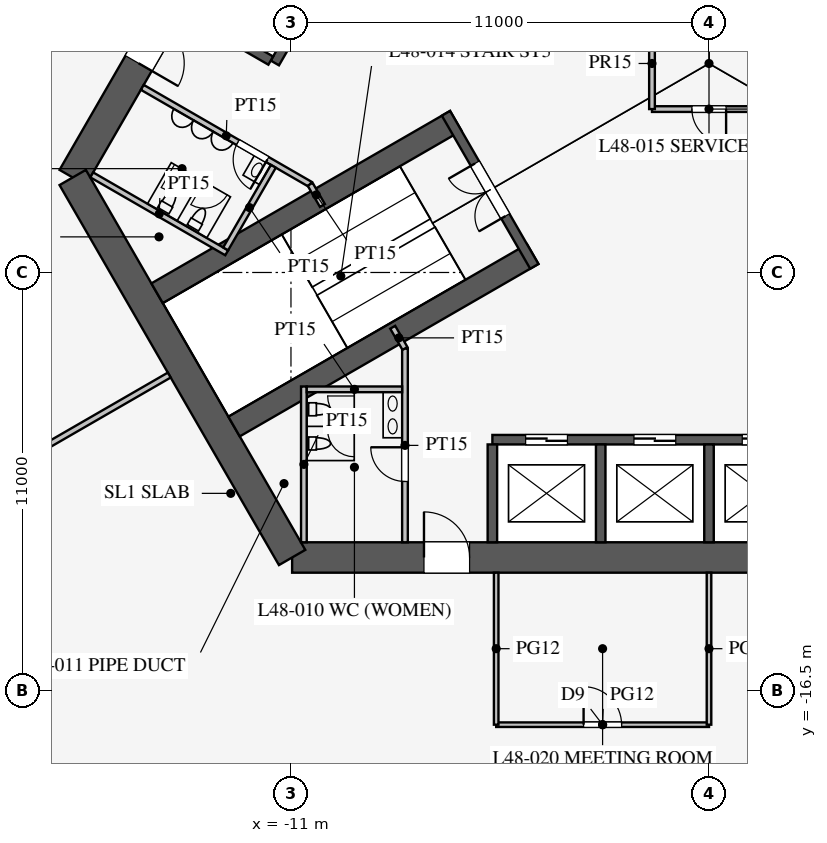
"""IFC4 building model, lengths in metres.
Left out: names, types, materials, properties, quantities, classifications, styles, units other than length and angle.
Written with IfcOpenShell. Run it as: python <this file> out.ifc"""

import sys

from ifc_helpers import new_model, si_unit, direction, frame, frame_2d, origin, place, context, subcontext, project, spatial, rectangle, extrude, element, fill, save


model = new_model("IFC4")
c1 = context("Model", 3, precision=1e-05, world=origin(), true_north=direction((0.0, 1.0)))
c2 = subcontext(c1, "Body", "Model", "MODEL_VIEW")
j1 = project(units=[si_unit("LENGTHUNIT", "METRE"), si_unit("PLANEANGLEUNIT", "RADIAN")], contexts=[c1])
p1 = place(None, origin())
s1 = spatial("IfcSite", under=j1, at=p1, CompositionType="ELEMENT")
p2 = place(p1, origin())
s2 = spatial("IfcBuilding", under=s1, at=p2, CompositionType="ELEMENT")
p3 = place(p2, frame((0.0, 0.0, 210.7)))
s3 = spatial("IfcBuildingStorey", under=s2, at=p3, CompositionType="ELEMENT", Elevation=210.7)
p4 = place(p3, frame((-10.97, -13.0, 0.0), z_axis=(0.0, 0.0, 1.0), x_axis=(1.0, 0.0, 0.0)))
e1 = element("IfcWall", 1, at=p4, inside=s3, PredefinedType="SHEAR", context=c2, shape_type="SweptSolid", body=[
    extrude(rectangle(XDim=21.939, YDim=0.8, at=frame_2d((10.97, 0.0))), origin(), (0.0, 0.0, 1.0), 4.2),
])
p5 = place(p4, frame((17.27, 0.0, 0.0)))
e2 = element("IfcOpeningElement", 2, at=p5, cuts=e1, PredefinedType="OPENING", context=c2, shape_type="SweptSolid", body=[
    extrude(rectangle(XDim=1.2, YDim=2.1, at=frame_2d((0.6, 1.05))), frame((0.0, 0.41, 0.0), z_axis=(0.0, -1.0, 0.0), x_axis=(1.0, 0.0, 0.0)), (0.0, 0.0, 1.0), 0.82),
])
p6 = place(p4, frame((3.47, 0.0, 0.0)))
e3 = element("IfcOpeningElement", 3, at=p6, cuts=e1, PredefinedType="OPENING", context=c2, shape_type="SweptSolid", body=[
    extrude(rectangle(XDim=1.2, YDim=2.1, at=frame_2d((0.6, 1.05))), frame((0.0, 0.41, 0.0), z_axis=(0.0, -1.0, 0.0), x_axis=(1.0, 0.0, 0.0)), (0.0, 0.0, 1.0), 0.82),
])
p7 = place(p3, frame((-5.773, 16.0, 0.0), z_axis=(0.0, 0.0, 1.0), x_axis=(-0.500002442456, -0.866023993627, 0.0)))
e4 = element("IfcWall", 4, at=p7, inside=s3, PredefinedType="SHEAR", context=c2, shape_type="SweptSolid", body=[
    extrude(rectangle(XDim=21.939, YDim=0.8, at=frame_2d((10.97, 0.0))), origin(), (0.0, 0.0, 1.0), 4.2),
])
p8 = place(p7, frame((17.27, 0.0, 0.0)))
e5 = element("IfcOpeningElement", 5, at=p8, cuts=e4, PredefinedType="OPENING", context=c2, shape_type="SweptSolid", body=[
    extrude(rectangle(XDim=1.2, YDim=2.1, at=frame_2d((0.6, 1.05))), frame((0.0, 0.41, 0.0), z_axis=(0.0, -1.0, 0.0), x_axis=(1.0, 0.0, 0.0)), (0.0, 0.0, 1.0), 0.82),
])
p9 = place(p7, frame((3.47, 0.0, 0.0)))
e6 = element("IfcOpeningElement", 6, at=p9, cuts=e4, PredefinedType="OPENING", context=c2, shape_type="SweptSolid", body=[
    extrude(rectangle(XDim=1.2, YDim=2.1, at=frame_2d((0.6, 1.05))), frame((0.0, 0.41, 0.0), z_axis=(0.0, -1.0, 0.0), x_axis=(1.0, 0.0, 0.0)), (0.0, 0.0, 1.0), 0.82),
])
p10 = place(p3, frame((-16.743, -3.0, 0.0), z_axis=(0.0, 0.0, 1.0), x_axis=(0.499995765644, -0.866027848477, 0.0)))
e7 = element("IfcWall", 7, at=p10, inside=s3, PredefinedType="SHEAR", context=c2, shape_type="SweptSolid", body=[
    extrude(rectangle(XDim=11.547, YDim=0.8, at=frame_2d((5.773, 0.0))), origin(), (0.0, 0.0, 1.0), 4.2),
])
p11 = place(p3, frame((-5.7, -9.9, 0.0), z_axis=(0.0, 0.0, 1.0), x_axis=(1.0, 0.0, 0.0)))
e8 = element("IfcWall", 8, at=p11, inside=s3, PredefinedType="SHEAR", context=c2, shape_type="SweptSolid", body=[
    extrude(rectangle(XDim=11.4, YDim=0.25, at=frame_2d((5.7, 0.0))), origin(), (0.0, 0.0, 1.0), 4.2),
])
p12 = place(p11, frame((0.875, 0.0, 0.0)))
e9 = element("IfcOpeningElement", 9, at=p12, cuts=e8, PredefinedType="OPENING", context=c2, shape_type="SweptSolid", body=[
    extrude(rectangle(XDim=1.1, YDim=2.2, at=frame_2d((0.55, 1.1))), frame((0.0, 0.135, 0.0), z_axis=(0.0, -1.0, 0.0), x_axis=(1.0, 0.0, 0.0)), (0.0, 0.0, 1.0), 0.27),
])
p13 = place(p11, frame((3.725, 0.0, 0.0)))
e10 = element("IfcOpeningElement", 10, at=p13, cuts=e8, PredefinedType="OPENING", context=c2, shape_type="SweptSolid", body=[
    extrude(rectangle(XDim=1.1, YDim=2.2, at=frame_2d((0.55, 1.1))), frame((0.0, 0.135, 0.0), z_axis=(0.0, -1.0, 0.0), x_axis=(1.0, 0.0, 0.0)), (0.0, 0.0, 1.0), 0.27),
])
p14 = place(p11, frame((6.575, 0.0, 0.0)))
e11 = element("IfcOpeningElement", 11, at=p14, cuts=e8, PredefinedType="OPENING", context=c2, shape_type="SweptSolid", body=[
    extrude(rectangle(XDim=1.1, YDim=2.2, at=frame_2d((0.55, 1.1))), frame((0.0, 0.135, 0.0), z_axis=(0.0, -1.0, 0.0), x_axis=(1.0, 0.0, 0.0)), (0.0, 0.0, 1.0), 0.27),
])
p15 = place(p11, frame((9.425, 0.0, 0.0)))
e12 = element("IfcOpeningElement", 12, at=p15, cuts=e8, PredefinedType="OPENING", context=c2, shape_type="SweptSolid", body=[
    extrude(rectangle(XDim=1.1, YDim=2.2, at=frame_2d((0.55, 1.1))), frame((0.0, 0.135, 0.0), z_axis=(0.0, -1.0, 0.0), x_axis=(1.0, 0.0, 0.0)), (0.0, 0.0, 1.0), 0.27),
])
for number, where, z_axis, x_axis in (
    (13, (-5.7, -10.025, 0.0), (0.0, 0.0, 1.0), (0.0, -1.0, 0.0)),
    (14, (-2.85, -10.025, 0.0), (0.0, 0.0, 1.0), (0.0, -1.0, 0.0)),
    (15, (0.0, -10.025, 0.0), (0.0, 0.0, 1.0), (0.0, -1.0, 0.0)),
):
    element("IfcWall", number, at=place(p3, frame(where, z_axis=z_axis, x_axis=x_axis)), inside=s3, PredefinedType="SHEAR", context=c2, shape_type="SweptSolid", body=[
        extrude(rectangle(XDim=2.575, YDim=0.25, at=frame_2d((1.288, 0.0))), origin(), (0.0, 0.0, 1.0), 4.2),
    ])
p16 = place(p3, frame((-5.724, 9.886, 0.0), z_axis=(0.0, 0.0, 1.0), x_axis=(-0.500001763848, -0.866024385424, 0.0)))
e16 = element("IfcWall", 16, at=p16, inside=s3, PredefinedType="SHEAR", context=c2, shape_type="SweptSolid", body=[
    extrude(rectangle(XDim=11.4, YDim=0.25, at=frame_2d((5.7, 0.0))), origin(), (0.0, 0.0, 1.0), 4.2),
])
p17 = place(p16, frame((6.525, 0.0, 0.0)))
e17 = element("IfcOpeningElement", 17, at=p17, cuts=e16, PredefinedType="OPENING", context=c2, shape_type="SweptSolid", body=[
    extrude(rectangle(XDim=1.2, YDim=2.2, at=frame_2d((0.6, 1.1))), frame((0.0, 0.135, 0.0), z_axis=(0.0, -1.0, 0.0), x_axis=(1.0, 0.0, 0.0)), (0.0, 0.0, 1.0), 0.27),
])
p18 = place(p16, frame((9.375, 0.0, 0.0)))
e18 = element("IfcOpeningElement", 18, at=p18, cuts=e16, PredefinedType="OPENING", context=c2, shape_type="SweptSolid", body=[
    extrude(rectangle(XDim=1.2, YDim=2.2, at=frame_2d((0.6, 1.1))), frame((0.0, 0.135, 0.0), z_axis=(0.0, -1.0, 0.0), x_axis=(1.0, 0.0, 0.0)), (0.0, 0.0, 1.0), 0.27),
])
p19 = place(p3, frame((-11.532, 0.076, 0.0), z_axis=(0.0, 0.0, 1.0), x_axis=(-0.866005588531, 0.500034319456, 0.0)))
e19 = element("IfcWall", 19, at=p19, inside=s3, PredefinedType="SHEAR", context=c2, shape_type="SweptSolid", body=[
    extrude(rectangle(XDim=2.575, YDim=0.25, at=frame_2d((1.288, 0.0))), origin(), (0.0, 0.0, 1.0), 4.2),
])
for number, where, z_axis, x_axis in (
    (20, (-6.663, -1.509, 0.0), (0.0, 0.0, 1.0), (-0.866, -0.5, 0.0)),
    (21, (-4.638, -5.016, 0.0), (0.0, 0.0, 1.0), (-0.866, -0.5, 0.0)),
):
    element("IfcWall", number, at=place(p3, frame(where, z_axis=z_axis, x_axis=x_axis)), inside=s3, PredefinedType="SHEAR", context=c2, shape_type="SweptSolid", body=[
        extrude(rectangle(XDim=9.075, YDim=0.6, at=frame_2d((4.538, 0.0))), origin(), (0.0, 0.0, 1.0), 4.2),
    ])
p20 = place(p3, frame((-6.922, -1.312, 0.0), z_axis=(0.0, 0.0, 1.0), x_axis=(0.499984536904, -0.866034331223, 0.0)))
e22 = element("IfcWall", 22, at=p20, inside=s3, PredefinedType="SHEAR", context=c2, shape_type="SweptSolid", body=[
    extrude(rectangle(XDim=4.65, YDim=0.25, at=frame_2d((2.325, 0.0))), origin(), (0.0, 0.0, 1.0), 4.2),
])
p21 = place(p20, frame((1.525, 0.0, 0.0)))
e23 = element("IfcOpeningElement", 23, at=p21, cuts=e22, PredefinedType="OPENING", context=c2, shape_type="SweptSolid", body=[
    extrude(rectangle(XDim=1.6, YDim=2.1, at=frame_2d((0.8, 1.05))), frame((0.0, 0.135, 0.0), z_axis=(0.0, -1.0, 0.0), x_axis=(1.0, 0.0, 0.0)), (0.0, 0.0, 1.0), 0.27),
])
p22 = place(p3, frame((-8.0, -7.5, 0.0), z_axis=(0.0, 0.0, 1.0), x_axis=(0.0, -1.0, 0.0)))
e24 = element("IfcWall", 24, at=p22, inside=s3, PredefinedType="PARTITIONING", context=c2, shape_type="SweptSolid", body=[
    extrude(rectangle(XDim=5.1, YDim=0.15, at=frame_2d((2.55, 0.0))), origin(), (0.0, 0.0, 1.0), 4.0),
])
p23 = place(p22, frame((2.6, 0.0, 0.0)))
e25 = element("IfcOpeningElement", 25, at=p23, cuts=e24, PredefinedType="OPENING", context=c2, shape_type="SweptSolid", body=[
    extrude(rectangle(XDim=0.9, YDim=2.1, at=frame_2d((0.45, 1.05))), frame((0.0, 0.085, 0.0), z_axis=(0.0, -1.0, 0.0), x_axis=(1.0, 0.0, 0.0)), (0.0, 0.0, 1.0), 0.17),
])
p24 = place(p3, frame((-10.495, -3.178, 0.0), z_axis=(0.0, 0.0, 1.0), x_axis=(-0.86602216432, 0.500005610874, 0.0)))
e26 = element("IfcWall", 26, at=p24, inside=s3, PredefinedType="PARTITIONING", context=c2, shape_type="SweptSolid", body=[
    extrude(rectangle(XDim=5.1, YDim=0.15, at=frame_2d((2.55, 0.0))), origin(), (0.0, 0.0, 1.0), 4.0),
])
p25 = place(p24, frame((1.3, 0.0, 0.0)))
e27 = element("IfcOpeningElement", 27, at=p25, cuts=e26, PredefinedType="OPENING", context=c2, shape_type="SweptSolid", body=[
    extrude(rectangle(XDim=0.9, YDim=2.1, at=frame_2d((0.45, 1.05))), frame((0.0, 0.085, 0.0), z_axis=(0.0, -1.0, 0.0), x_axis=(1.0, 0.0, 0.0)), (0.0, 0.0, 1.0), 0.17),
])
for number, where, z_axis, x_axis in (
    (28, (-10.495, -3.178, 0.0), (0.0, 0.0, 1.0), (0.5, -0.866, 0.0)),
    (29, (-8.0, -7.5, 0.0), (0.0, 0.0, 1.0), (-0.5, 0.866, 0.0)),
):
    element("IfcWall", number, at=place(p3, frame(where, z_axis=z_axis, x_axis=x_axis)), inside=s3, PredefinedType="PARTITIONING", context=c2, shape_type="SweptSolid", body=[
        extrude(rectangle(XDim=0.645, YDim=0.15, at=frame_2d((0.323, 0.0))), origin(), (0.0, 0.0, 1.0), 4.0),
    ])
p26 = place(p3, frame((-12.691, -4.982, 0.0), z_axis=(0.0, 0.0, 1.0), x_axis=(-0.8660249478, 0.500000789788, 0.0)))
e30 = element("IfcWall", 30, at=p26, inside=s3, PredefinedType="PARTITIONING", context=c2, shape_type="SweptSolid", body=[
    extrude(rectangle(XDim=4.1, YDim=0.15, at=frame_2d((2.05, 0.0))), origin(), (0.0, 0.0, 1.0), 4.0),
])
p27 = place(p3, frame((-11.464, -2.706, 0.0), z_axis=(0.0, 0.0, 1.0), x_axis=(-0.50001992892, -0.866013897511, 0.0)))
e31 = element("IfcWall", 31, at=p27, inside=s3, PredefinedType="PARTITIONING", context=c2, shape_type="SweptSolid", body=[
    extrude(rectangle(XDim=2.51, YDim=0.15, at=frame_2d((1.255, 0.0))), origin(), (0.0, 0.0, 1.0), 4.0),
])
p28 = place(p3, frame((-10.66, -8.5, 0.0), z_axis=(0.0, 0.0, 1.0), x_axis=(0.0, -1.0, 0.0)))
e32 = element("IfcWall", 32, at=p28, inside=s3, PredefinedType="PARTITIONING", context=c2, shape_type="SweptSolid", body=[
    extrude(rectangle(XDim=4.1, YDim=0.15, at=frame_2d((2.05, 0.0))), origin(), (0.0, 0.0, 1.0), 4.0),
])
p29 = place(p3, frame((-8.075, -8.575, 0.0), z_axis=(0.0, 0.0, 1.0), x_axis=(-1.0, 0.0, 0.0)))
e33 = element("IfcWall", 33, at=p29, inside=s3, PredefinedType="PARTITIONING", context=c2, shape_type="SweptSolid", body=[
    extrude(rectangle(XDim=2.51, YDim=0.15, at=frame_2d((1.255, 0.0))), origin(), (0.0, 0.0, 1.0), 4.0),
])
p30 = place(p3, frame((-1.5, -1.2, 0.0), z_axis=(0.0, 0.0, 1.0), x_axis=(1.0, 0.0, 0.0)))
e34 = element("IfcWall", 34, at=p30, inside=s3, PredefinedType="PARTITIONING", context=c2, shape_type="SweptSolid", body=[
    extrude(rectangle(XDim=3.0, YDim=0.15, at=frame_2d((1.5, 0.0))), origin(), (0.0, 0.0, 1.0), 4.0),
])
p31 = place(p30, frame((1.05, 0.0, 0.0)))
e35 = element("IfcOpeningElement", 35, at=p31, cuts=e34, PredefinedType="OPENING", context=c2, shape_type="SweptSolid", body=[
    extrude(rectangle(XDim=0.9, YDim=2.1, at=frame_2d((0.45, 1.05))), frame((0.0, 0.085, 0.0), z_axis=(0.0, -1.0, 0.0), x_axis=(1.0, 0.0, 0.0)), (0.0, 0.0, 1.0), 0.17),
])
p32 = place(p3, frame((-1.5, 1.2, 0.0), z_axis=(0.0, 0.0, 1.0), x_axis=(0.0, -1.0, 0.0)))
e36 = element("IfcWall", 36, at=p32, inside=s3, PredefinedType="PARTITIONING", context=c2, shape_type="SweptSolid", body=[
    extrude(rectangle(XDim=2.4, YDim=0.15, at=frame_2d((1.2, 0.0))), origin(), (0.0, 0.0, 1.0), 4.0),
])
p33 = place(p3, frame((-14.203, -8.2, 0.0), z_axis=(0.0, 0.0, 1.0), x_axis=(-0.866021600284, -0.500006587798, 0.0)))
e37 = element("IfcWall", 37, at=p33, inside=s3, PredefinedType="PARTITIONING", context=c2, shape_type="SweptSolid", body=[
    extrude(rectangle(XDim=14.95, YDim=0.15, at=frame_2d((7.475, 0.0))), origin(), (0.0, 0.0, 1.0), 2.4),
])
p34 = place(p3, frame((-5.6, -17.4, 0.0), z_axis=(0.0, 0.0, 1.0), x_axis=(1.0, 0.0, 0.0)))
e38 = element("IfcWall", 38, at=p34, inside=s3, PredefinedType="PARTITIONING", context=c2, shape_type="SweptSolid", body=[
    extrude(rectangle(XDim=5.6, YDim=0.12, at=frame_2d((2.8, 0.0))), origin(), (0.0, 0.0, 1.0), 2.9),
])
p35 = place(p34, frame((2.3, 0.0, 0.15)))
e39 = element("IfcOpeningElement", 39, at=p35, cuts=e38, PredefinedType="OPENING", context=c2, shape_type="SweptSolid", body=[
    extrude(rectangle(XDim=1.0, YDim=2.1, at=frame_2d((0.5, 1.05))), frame((0.0, 0.07, 0.0), z_axis=(0.0, -1.0, 0.0), x_axis=(1.0, 0.0, 0.0)), (0.0, 0.0, 1.0), 0.14),
])
for number, where, z_axis, x_axis in (
    (40, (0.0, -13.4, 0.0), (0.0, 0.0, 1.0), (0.0, -1.0, 0.0)),
    (41, (-5.6, -13.4, 0.0), (0.0, 0.0, 1.0), (0.0, -1.0, 0.0)),
):
    element("IfcWall", number, at=place(p3, frame(where, z_axis=z_axis, x_axis=x_axis)), inside=s3, PredefinedType="PARTITIONING", context=c2, shape_type="SweptSolid", body=[
        extrude(rectangle(XDim=4.0, YDim=0.12, at=frame_2d((2.0, 0.0))), origin(), (0.0, 0.0, 1.0), 2.9),
    ])
p36 = place(p3, frame((26.415, -15.231, 0.0), z_axis=(0.0, 0.0, 1.0), x_axis=(-0.50000091641, 0.866024874695, 0.0)))
e42 = element("IfcWall", 42, at=p36, inside=s3, PredefinedType="PARTITIONING", context=c2, shape_type="SweptSolid", body=[
    extrude(rectangle(XDim=52.796, YDim=0.12, at=frame_2d((26.398, 0.0))), origin(), (0.0, 0.0, 1.0), 2.9),
])
p37 = place(p36, frame((10.2, 0.0, 0.15)))
e43 = element("IfcOpeningElement", 43, at=p37, cuts=e42, PredefinedType="OPENING", context=c2, shape_type="SweptSolid", body=[
    extrude(rectangle(XDim=1.8, YDim=2.1, at=frame_2d((0.9, 1.05))), frame((0.0, 0.07, 0.0), z_axis=(0.0, -1.0, 0.0), x_axis=(1.0, 0.0, 0.0)), (0.0, 0.0, 1.0), 0.14),
])
p38 = place(p36, frame((40.8, 0.0, 0.15)))
e44 = element("IfcOpeningElement", 44, at=p38, cuts=e42, PredefinedType="OPENING", context=c2, shape_type="SweptSolid", body=[
    extrude(rectangle(XDim=1.8, YDim=2.1, at=frame_2d((0.9, 1.05))), frame((0.0, 0.07, 0.0), z_axis=(0.0, -1.0, 0.0), x_axis=(1.0, 0.0, 0.0)), (0.0, 0.0, 1.0), 0.14),
])
p39 = place(p23, frame((0.9, 0.0, 0.0), z_axis=(0.0, 0.0, 1.0), x_axis=(-1.0, 0.0, 0.0)))
e45 = element("IfcDoor", 45, at=p39, inside=s3, OperationType="SINGLE_SWING_RIGHT", PredefinedType="DOOR", context=c2, shape_type="SweptSolid", body=[
    extrude(rectangle(XDim=0.9, YDim=2.1, at=frame_2d((0.45, 1.05))), frame((0.0, 0.025, 0.0), z_axis=(0.0, -1.0, 0.0), x_axis=(1.0, 0.0, 0.0)), (0.0, 0.0, 1.0), 0.05),
])
fill(e25, e45)
p40 = place(p25, origin())
e46 = element("IfcDoor", 46, at=p40, inside=s3, OperationType="SINGLE_SWING_LEFT", PredefinedType="DOOR", context=c2, shape_type="SweptSolid", body=[
    extrude(rectangle(XDim=0.9, YDim=2.1, at=frame_2d((0.45, 1.05))), frame((0.0, 0.025, 0.0), z_axis=(0.0, -1.0, 0.0), x_axis=(1.0, 0.0, 0.0)), (0.0, 0.0, 1.0), 0.05),
])
fill(e27, e46)
p41 = place(p31, frame((0.9, 0.0, 0.0), z_axis=(0.0, 0.0, 1.0), x_axis=(-1.0, 0.0, 0.0)))
e47 = element("IfcDoor", 47, at=p41, inside=s3, OperationType="SINGLE_SWING_LEFT", PredefinedType="DOOR", context=c2, shape_type="SweptSolid", body=[
    extrude(rectangle(XDim=0.9, YDim=2.1, at=frame_2d((0.45, 1.05))), frame((0.0, 0.025, 0.0), z_axis=(0.0, -1.0, 0.0), x_axis=(1.0, 0.0, 0.0)), (0.0, 0.0, 1.0), 0.05),
])
fill(e35, e47)
p42 = place(p21, frame((1.6, 0.0, 0.0), z_axis=(0.0, 0.0, 1.0), x_axis=(-1.0, 0.0, 0.0)))
e48 = element("IfcDoor", 48, at=p42, inside=s3, OperationType="DOUBLE_DOOR_SINGLE_SWING", PredefinedType="DOOR", context=c2, shape_type="SweptSolid", body=[
    extrude(rectangle(XDim=1.6, YDim=2.1, at=frame_2d((0.8, 1.05))), frame((0.0, 0.025, 0.0), z_axis=(0.0, -1.0, 0.0), x_axis=(1.0, 0.0, 0.0)), (0.0, 0.0, 1.0), 0.05),
])
fill(e23, e48)
p43 = place(p6, origin())
e49 = element("IfcDoor", 49, at=p43, inside=s3, OperationType="SINGLE_SWING_LEFT", PredefinedType="DOOR", context=c2, shape_type="SweptSolid", body=[
    extrude(rectangle(XDim=1.2, YDim=2.1, at=frame_2d((0.6, 1.05))), frame((0.0, 0.025, 0.0), z_axis=(0.0, -1.0, 0.0), x_axis=(1.0, 0.0, 0.0)), (0.0, 0.0, 1.0), 0.05),
])
fill(e3, e49)
p44 = place(p8, origin())
e50 = element("IfcDoor", 50, at=p44, inside=s3, OperationType="SINGLE_SWING_RIGHT", PredefinedType="DOOR", context=c2, shape_type="SweptSolid", body=[
    extrude(rectangle(XDim=1.2, YDim=2.1, at=frame_2d((0.6, 1.05))), frame((0.0, 0.025, 0.0), z_axis=(0.0, -1.0, 0.0), x_axis=(1.0, 0.0, 0.0)), (0.0, 0.0, 1.0), 0.05),
])
fill(e5, e50)
p45 = place(p35, origin())
e51 = element("IfcDoor", 51, at=p45, inside=s3, OperationType="SINGLE_SWING_LEFT", PredefinedType="DOOR", context=c2, shape_type="SweptSolid", body=[
    extrude(rectangle(XDim=1.0, YDim=2.1, at=frame_2d((0.5, 1.05))), frame((0.0, 0.025, 0.0), z_axis=(0.0, -1.0, 0.0), x_axis=(1.0, 0.0, 0.0)), (0.0, 0.0, 1.0), 0.05),
])
fill(e39, e51)
p46 = place(p12, origin())
e52 = element("IfcDoor", 52, at=p46, inside=s3, OperationType="DOUBLE_DOOR_SLIDING", PredefinedType="DOOR", context=c2, shape_type="SweptSolid", body=[
    extrude(rectangle(XDim=1.1, YDim=2.2, at=frame_2d((0.55, 1.1))), frame((0.0, 0.025, 0.0), z_axis=(0.0, -1.0, 0.0), x_axis=(1.0, 0.0, 0.0)), (0.0, 0.0, 1.0), 0.05),
])
fill(e9, e52)
p47 = place(p13, origin())
e53 = element("IfcDoor", 53, at=p47, inside=s3, OperationType="DOUBLE_DOOR_SLIDING", PredefinedType="DOOR", context=c2, shape_type="SweptSolid", body=[
    extrude(rectangle(XDim=1.1, YDim=2.2, at=frame_2d((0.55, 1.1))), frame((0.0, 0.025, 0.0), z_axis=(0.0, -1.0, 0.0), x_axis=(1.0, 0.0, 0.0)), (0.0, 0.0, 1.0), 0.05),
])
fill(e10, e53)
p48 = place(p14, origin())
e54 = element("IfcDoor", 54, at=p48, inside=s3, OperationType="DOUBLE_DOOR_SLIDING", PredefinedType="DOOR", context=c2, shape_type="SweptSolid", body=[
    extrude(rectangle(XDim=1.1, YDim=2.2, at=frame_2d((0.55, 1.1))), frame((0.0, 0.025, 0.0), z_axis=(0.0, -1.0, 0.0), x_axis=(1.0, 0.0, 0.0)), (0.0, 0.0, 1.0), 0.05),
])
fill(e11, e54)
save(model, sys.argv[1])
